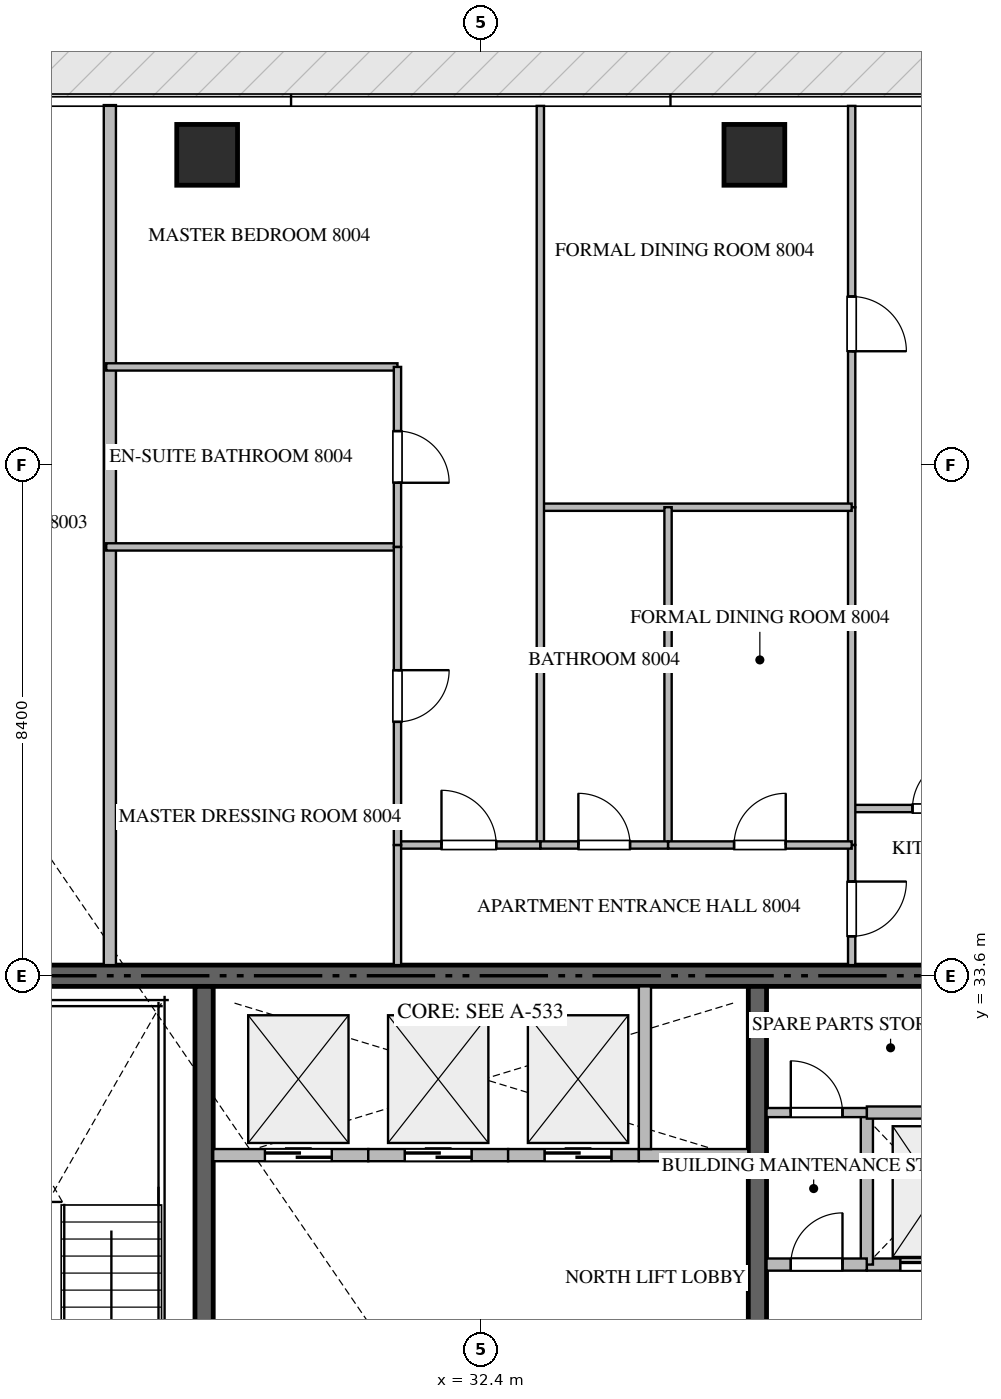
"""IFC4 building model, lengths in metres.
Left out: names, types, materials, properties, quantities, classifications, styles, units other than length and angle.
Written with IfcOpenShell. Run it as: python <this file> out.ifc"""

import sys

from ifc_helpers import new_model, si_unit, direction, frame, frame_2d, origin, origin_2d, place, context, subcontext, project, spatial, rectangle, extrude, source, transform, mapped, element, fill, save


model = new_model("IFC4")
c1 = context("Model", 3, precision=1e-05, world=origin(), true_north=direction((0.0, 1.0)))
c2 = subcontext(c1, "Body", "Model", "MODEL_VIEW")
j1 = project(units=[si_unit("LENGTHUNIT", "METRE"), si_unit("PLANEANGLEUNIT", "RADIAN")], contexts=[c1])
p1 = place(None, origin())
s1 = spatial("IfcSite", under=j1, at=p1, CompositionType="ELEMENT")
p2 = place(p1, origin())
s2 = spatial("IfcBuilding", under=s1, at=p2, CompositionType="ELEMENT")
p3 = place(p2, frame((0.0, 0.0, 321.8)))
s3 = spatial("IfcBuildingStorey", under=s2, at=p3, CompositionType="ELEMENT", Elevation=321.8)
p4 = place(p3, frame((41.4, 33.6, -0.26), z_axis=(0.0, 0.0, 1.0), x_axis=(-1.0, 0.0, 0.0)))
e1 = element("IfcWall", 1, at=p4, inside=s3, PredefinedType="SHEAR", context=c2, shape_type="SweptSolid", body=[
    extrude(rectangle(XDim=18.0, YDim=0.35, at=frame_2d((9.0, 0.0))), origin(), (0.0, 0.0, 1.0), 4.048),
])
p5 = place(p3, frame((27.85, 23.55, -0.26), z_axis=(0.0, 0.0, 1.0), x_axis=(0.0, 1.0, 0.0)))
e2 = element("IfcWall", 2, at=p5, inside=s3, PredefinedType="SHEAR", context=c2, shape_type="SweptSolid", body=[
    extrude(rectangle(XDim=9.875, YDim=0.3, at=frame_2d((4.938, 0.0))), origin(), (0.0, 0.0, 1.0), 4.048),
])
p6 = place(p3, frame((36.95, 27.05, -0.26), z_axis=(0.0, 0.0, 1.0), x_axis=(0.0, 1.0, 0.0)))
e3 = element("IfcWall", 3, at=p6, inside=s3, PredefinedType="SHEAR", context=c2, shape_type="SweptSolid", body=[
    extrude(rectangle(XDim=6.375, YDim=0.3, at=frame_2d((3.188, 0.0))), origin(), (0.0, 0.0, 1.0), 4.048),
])
m1 = source(origin(), c2, "Body", "SweptSolid", [
    extrude(rectangle(XDim=1.0, YDim=1.0, at=origin_2d()), origin(), (0.0, 0.0, 1.0), 4.05),
])
for number, where, z_axis, x_axis in (
    (4, (27.9, 47.1, -0.26), (0.0, 0.0, 1.0), (1.0, 0.0, 0.0)),
    (5, (36.9, 47.1, -0.26), (0.0, 0.0, 1.0), (1.0, 0.0, 0.0)),
):
    element("IfcColumn", number, at=place(p3, frame(where, z_axis=z_axis, x_axis=x_axis)), inside=s3, PredefinedType="COLUMN", context=c2, shape_type="MappedRepresentation", body=[
        mapped(m1, transform((0.0, 0.0, 0.0), scale=1.0)),
    ])
p7 = place(p3, frame((38.75, 28.85, 0.0), z_axis=(0.0, 0.0, 1.0), x_axis=(1.0, 0.0, 0.0)))
e6 = element("IfcWall", 6, at=p7, inside=s3, PredefinedType="STANDARD", context=c2, shape_type="SweptSolid", body=[
    extrude(rectangle(XDim=2.475, YDim=0.2, at=frame_2d((1.238, 0.0))), origin(), (0.0, 0.0, 1.0), 3.79),
])
p8 = place(p7, frame((0.55, 0.0, 0.0)))
e7 = element("IfcOpeningElement", 7, at=p8, cuts=e6, PredefinedType="OPENING", context=c2, shape_type="SweptSolid", body=[
    extrude(rectangle(XDim=1.2, YDim=2.2, at=frame_2d((0.6, 1.1))), frame((0.0, 0.11, 0.0), z_axis=(0.0, -1.0, 0.0), x_axis=(1.0, 0.0, 0.0)), (0.0, 0.0, 1.0), 0.22),
])
p9 = place(p3, frame((28.0, 30.65, 0.0), z_axis=(0.0, 0.0, 1.0), x_axis=(1.0, 0.0, 0.0)))
e8 = element("IfcWall", 8, at=p9, inside=s3, PredefinedType="STANDARD", context=c2, shape_type="SweptSolid", body=[
    extrude(rectangle(XDim=2.55, YDim=0.2, at=frame_2d((1.275, 0.0))), origin(), (0.0, 0.0, 1.0), 3.79),
])
p10 = place(p9, frame((0.85, 0.0, 0.0)))
e9 = element("IfcOpeningElement", 9, at=p10, cuts=e8, PredefinedType="OPENING", context=c2, shape_type="SweptSolid", body=[
    extrude(rectangle(XDim=1.1, YDim=2.2, at=frame_2d((0.55, 1.1))), frame((0.0, 0.11, 0.0), z_axis=(0.0, -1.0, 0.0), x_axis=(1.0, 0.0, 0.0)), (0.0, 0.0, 1.0), 0.22),
])
p11 = place(p3, frame((30.55, 30.65, 0.0), z_axis=(0.0, 0.0, 1.0), x_axis=(1.0, 0.0, 0.0)))
e10 = element("IfcWall", 10, at=p11, inside=s3, PredefinedType="STANDARD", context=c2, shape_type="SweptSolid", body=[
    extrude(rectangle(XDim=2.3, YDim=0.2, at=frame_2d((1.15, 0.0))), origin(), (0.0, 0.0, 1.0), 3.79),
])
p12 = place(p11, frame((0.6, 0.0, 0.0)))
e11 = element("IfcOpeningElement", 11, at=p12, cuts=e10, PredefinedType="OPENING", context=c2, shape_type="SweptSolid", body=[
    extrude(rectangle(XDim=1.1, YDim=2.2, at=frame_2d((0.55, 1.1))), frame((0.0, 0.11, 0.0), z_axis=(0.0, -1.0, 0.0), x_axis=(1.0, 0.0, 0.0)), (0.0, 0.0, 1.0), 0.22),
])
p13 = place(p3, frame((32.85, 30.65, 0.0), z_axis=(0.0, 0.0, 1.0), x_axis=(1.0, 0.0, 0.0)))
e12 = element("IfcWall", 12, at=p13, inside=s3, PredefinedType="STANDARD", context=c2, shape_type="SweptSolid", body=[
    extrude(rectangle(XDim=2.15, YDim=0.2, at=frame_2d((1.075, 0.0))), origin(), (0.0, 0.0, 1.0), 3.79),
])
p14 = place(p13, frame((0.6, 0.0, 0.0)))
e13 = element("IfcOpeningElement", 13, at=p14, cuts=e12, PredefinedType="OPENING", context=c2, shape_type="SweptSolid", body=[
    extrude(rectangle(XDim=1.1, YDim=2.2, at=frame_2d((0.55, 1.1))), frame((0.0, 0.11, 0.0), z_axis=(0.0, -1.0, 0.0), x_axis=(1.0, 0.0, 0.0)), (0.0, 0.0, 1.0), 0.22),
])
p15 = place(p3, frame((35.0, 30.65, 0.0), z_axis=(0.0, 0.0, 1.0), x_axis=(1.0, 0.0, 0.0)))
e14 = element("IfcWall", 14, at=p15, inside=s3, PredefinedType="STANDARD", context=c2, shape_type="SweptSolid", body=[
    extrude(rectangle(XDim=1.8, YDim=0.2, at=frame_2d((0.9, 0.0))), origin(), (0.0, 0.0, 1.0), 3.79),
])
p16 = place(p3, frame((35.1, 30.75, 0.0), z_axis=(0.0, 0.0, 1.0), x_axis=(0.0, 1.0, 0.0)))
e15 = element("IfcWall", 15, at=p16, inside=s3, PredefinedType="STANDARD", context=c2, shape_type="SweptSolid", body=[
    extrude(rectangle(XDim=2.675, YDim=0.2, at=frame_2d((1.337, 0.0))), origin(), (0.0, 0.0, 1.0), 3.79),
])
p17 = place(p3, frame((38.75, 28.85, 0.0), z_axis=(0.0, 0.0, 1.0), x_axis=(0.0, 1.0, 0.0)))
e16 = element("IfcWall", 16, at=p17, inside=s3, PredefinedType="STANDARD", context=c2, shape_type="SweptSolid", body=[
    extrude(rectangle(XDim=2.5, YDim=0.2, at=frame_2d((1.25, 0.0))), origin(), (0.0, 0.0, 1.0), 3.79),
])
p18 = place(p3, frame((38.75, 31.35, 0.0), z_axis=(0.0, 0.0, 1.0), x_axis=(1.0, 0.0, 0.0)))
e17 = element("IfcWall", 17, at=p18, inside=s3, PredefinedType="STANDARD", context=c2, shape_type="SweptSolid", body=[
    extrude(rectangle(XDim=2.475, YDim=0.2, at=frame_2d((1.238, 0.0))), origin(), (0.0, 0.0, 1.0), 3.79),
])
p19 = place(p3, frame((37.1, 28.85, 0.0), z_axis=(0.0, 0.0, 1.0), x_axis=(1.0, 0.0, 0.0)))
e18 = element("IfcWall", 18, at=p19, inside=s3, PredefinedType="STANDARD", context=c2, shape_type="SweptSolid", body=[
    extrude(rectangle(XDim=1.648, YDim=0.2, at=frame_2d((0.824, 0.0))), origin(), (0.0, 0.0, 1.0), 3.79),
])
p20 = place(p19, frame((0.399, 0.0, 0.0)))
e19 = element("IfcOpeningElement", 19, at=p20, cuts=e18, PredefinedType="OPENING", context=c2, shape_type="SweptSolid", body=[
    extrude(rectangle(XDim=0.85, YDim=2.1, at=frame_2d((0.425, 1.05))), frame((0.0, 0.11, 0.0), z_axis=(0.0, -1.0, 0.0), x_axis=(1.0, 0.0, 0.0)), (0.0, 0.0, 1.0), 0.22),
])
p21 = place(p3, frame((37.1, 31.35, 0.0), z_axis=(0.0, 0.0, 1.0), x_axis=(1.0, 0.0, 0.0)))
e20 = element("IfcWall", 20, at=p21, inside=s3, PredefinedType="PARTITIONING", context=c2, shape_type="SweptSolid", body=[
    extrude(rectangle(XDim=1.648, YDim=0.15, at=frame_2d((0.824, 0.0))), origin(), (0.0, 0.0, 1.0), 3.79),
])
p22 = place(p21, frame((0.399, 0.0, 0.0)))
e21 = element("IfcOpeningElement", 21, at=p22, cuts=e20, PredefinedType="OPENING", context=c2, shape_type="SweptSolid", body=[
    extrude(rectangle(XDim=0.85, YDim=2.1, at=frame_2d((0.425, 1.05))), frame((0.0, 0.085, 0.0), z_axis=(0.0, -1.0, 0.0), x_axis=(1.0, 0.0, 0.0)), (0.0, 0.0, 1.0), 0.17),
])
p23 = place(p3, frame((26.3, 33.775, 0.0), z_axis=(0.0, 0.0, 1.0), x_axis=(0.0, 1.0, 0.0)))
e22 = element("IfcWall", 22, at=p23, inside=s3, PredefinedType="PARTITIONING", context=c2, shape_type="SweptSolid", body=[
    extrude(rectangle(XDim=14.143, YDim=0.2, at=frame_2d((7.072, 0.0))), origin(), (0.0, 0.0, 1.0), 3.79),
])
p24 = place(p3, frame((38.5, 36.35, 0.0), z_axis=(0.0, 0.0, 1.0), x_axis=(1.0, 0.0, 0.0)))
e23 = element("IfcWall", 23, at=p24, inside=s3, PredefinedType="PARTITIONING", context=c2, shape_type="SweptSolid", body=[
    extrude(rectangle(XDim=2.85, YDim=0.12, at=frame_2d((1.425, 0.0))), origin(), (0.0, 0.0, 1.0), 3.492),
])
p25 = place(p24, frame((1.0, 0.0, 0.0)))
e24 = element("IfcOpeningElement", 24, at=p25, cuts=e23, PredefinedType="OPENING", context=c2, shape_type="SweptSolid", body=[
    extrude(rectangle(XDim=0.85, YDim=2.1, at=frame_2d((0.425, 1.05))), frame((0.0, 0.07, 0.0), z_axis=(0.0, -1.0, 0.0), x_axis=(1.0, 0.0, 0.0)), (0.0, 0.0, 1.0), 0.14),
])
p26 = place(p3, frame((38.5, 35.75, 0.0), z_axis=(0.0, 0.0, 1.0), x_axis=(0.0, -1.0, 0.0)))
e25 = element("IfcWall", 25, at=p26, inside=s3, PredefinedType="PARTITIONING", context=c2, shape_type="SweptSolid", body=[
    extrude(rectangle(XDim=1.975, YDim=0.12, at=frame_2d((0.988, 0.0))), origin(), (0.0, 0.0, 1.0), 3.79),
])
p27 = place(p26, frame((0.601, 0.0, 0.0)))
e26 = element("IfcOpeningElement", 26, at=p27, cuts=e25, PredefinedType="OPENING", context=c2, shape_type="SweptSolid", body=[
    extrude(rectangle(XDim=0.9, YDim=2.1, at=frame_2d((0.45, 1.05))), frame((0.0, 0.07, 0.0), z_axis=(0.0, -1.0, 0.0), x_axis=(1.0, 0.0, 0.0)), (0.0, 0.0, 1.0), 0.14),
])
p28 = place(p3, frame((38.5, 47.905, 0.0), z_axis=(0.0, 0.0, 1.0), x_axis=(0.0, -1.0, 0.0)))
e27 = element("IfcWall", 27, at=p28, inside=s3, PredefinedType="PARTITIONING", context=c2, shape_type="SweptSolid", body=[
    extrude(rectangle(XDim=6.6, YDim=0.12, at=frame_2d((3.3, 0.0))), origin(), (0.0, 0.0, 1.0), 3.79),
])
p29 = place(p28, frame((3.135, 0.0, 0.0)))
e28 = element("IfcOpeningElement", 28, at=p29, cuts=e27, PredefinedType="OPENING", context=c2, shape_type="SweptSolid", body=[
    extrude(rectangle(XDim=0.9, YDim=2.1, at=frame_2d((0.45, 1.05))), frame((0.0, 0.07, 0.0), z_axis=(0.0, -1.0, 0.0), x_axis=(1.0, 0.0, 0.0)), (0.0, 0.0, 1.0), 0.14),
])
p30 = place(p3, frame((38.5, 41.303, 0.0), z_axis=(0.0, 0.0, 1.0), x_axis=(0.0, -1.0, 0.0)))
e29 = element("IfcWall", 29, at=p30, inside=s3, PredefinedType="PARTITIONING", context=c2, shape_type="SweptSolid", body=[
    extrude(rectangle(XDim=5.551, YDim=0.12, at=frame_2d((2.775, 0.0))), origin(), (0.0, 0.0, 1.0), 3.79),
])
p31 = place(p3, frame((33.38, 41.305, 0.0), z_axis=(0.0, 0.0, 1.0), x_axis=(1.0, 0.0, 0.0)))
e30 = element("IfcWall", 30, at=p31, inside=s3, PredefinedType="PARTITIONING", context=c2, shape_type="SweptSolid", body=[
    extrude(rectangle(XDim=5.12, YDim=0.12, at=frame_2d((2.56, 0.0))), origin(), (0.0, 0.0, 1.0), 3.79),
])
p32 = place(p3, frame((33.38, 47.905, 0.0), z_axis=(0.0, 0.0, 1.0), x_axis=(0.0, -1.0, 0.0)))
e31 = element("IfcWall", 31, at=p32, inside=s3, PredefinedType="PARTITIONING", context=c2, shape_type="SweptSolid", body=[
    extrude(rectangle(XDim=12.155, YDim=0.12, at=frame_2d((6.078, 0.0))), origin(), (0.0, 0.0, 1.0), 3.79),
])
p33 = place(p3, frame((35.48, 41.305, 0.0), z_axis=(0.0, 0.0, 1.0), x_axis=(0.0, -1.0, 0.0)))
e32 = element("IfcWall", 32, at=p33, inside=s3, PredefinedType="PARTITIONING", context=c2, shape_type="SweptSolid", body=[
    extrude(rectangle(XDim=5.555, YDim=0.12, at=frame_2d((2.777, 0.0))), origin(), (0.0, 0.0, 1.0), 3.79),
])
p34 = place(p3, frame((33.38, 35.75, 0.0), z_axis=(0.0, 0.0, 1.0), x_axis=(1.0, 0.0, 0.0)))
e33 = element("IfcWall", 33, at=p34, inside=s3, PredefinedType="PARTITIONING", context=c2, shape_type="SweptSolid", body=[
    extrude(rectangle(XDim=2.1, YDim=0.12, at=frame_2d((1.05, 0.0))), origin(), (0.0, 0.0, 1.0), 3.79),
])
p35 = place(p34, frame((0.625, 0.0, 0.0)))
e34 = element("IfcOpeningElement", 34, at=p35, cuts=e33, PredefinedType="OPENING", context=c2, shape_type="SweptSolid", body=[
    extrude(rectangle(XDim=0.85, YDim=2.1, at=frame_2d((0.425, 1.05))), frame((0.0, 0.07, 0.0), z_axis=(0.0, -1.0, 0.0), x_axis=(1.0, 0.0, 0.0)), (0.0, 0.0, 1.0), 0.14),
])
p36 = place(p3, frame((35.482, 35.75, 0.0), z_axis=(0.0, 0.0, 1.0), x_axis=(1.0, 0.0, 0.0)))
e35 = element("IfcWall", 35, at=p36, inside=s3, PredefinedType="PARTITIONING", context=c2, shape_type="SweptSolid", body=[
    extrude(rectangle(XDim=3.018, YDim=0.12, at=frame_2d((1.509, 0.0))), origin(), (0.0, 0.0, 1.0), 3.79),
])
p37 = place(p36, frame((1.084, 0.0, 0.0)))
e36 = element("IfcOpeningElement", 36, at=p37, cuts=e35, PredefinedType="OPENING", context=c2, shape_type="SweptSolid", body=[
    extrude(rectangle(XDim=0.85, YDim=2.1, at=frame_2d((0.425, 1.05))), frame((0.0, 0.07, 0.0), z_axis=(0.0, -1.0, 0.0), x_axis=(1.0, 0.0, 0.0)), (0.0, 0.0, 1.0), 0.14),
])
p38 = place(p3, frame((31.03, 35.75, 0.0), z_axis=(0.0, 0.0, 1.0), x_axis=(1.0, 0.0, 0.0)))
e37 = element("IfcWall", 37, at=p38, inside=s3, PredefinedType="PARTITIONING", context=c2, shape_type="SweptSolid", body=[
    extrude(rectangle(XDim=2.348, YDim=0.12, at=frame_2d((1.174, 0.0))), origin(), (0.0, 0.0, 1.0), 3.79),
])
p39 = place(p38, frame((0.724, 0.0, 0.0)))
e38 = element("IfcOpeningElement", 38, at=p39, cuts=e37, PredefinedType="OPENING", context=c2, shape_type="SweptSolid", body=[
    extrude(rectangle(XDim=0.9, YDim=2.1, at=frame_2d((0.45, 1.05))), frame((0.0, 0.07, 0.0), z_axis=(0.0, -1.0, 0.0), x_axis=(1.0, 0.0, 0.0)), (0.0, 0.0, 1.0), 0.14),
])
for number, where, z_axis, x_axis in (
    (39, (26.24, 43.612, 0.0), (0.0, 0.0, 1.0), (1.0, 0.0, 0.0)),
    (40, (26.24, 40.652, 0.0), (0.0, 0.0, 1.0), (1.0, 0.0, 0.0)),
):
    element("IfcWall", number, at=place(p3, frame(where, z_axis=z_axis, x_axis=x_axis)), inside=s3, PredefinedType="PARTITIONING", context=c2, shape_type="SweptSolid", body=[
        extrude(rectangle(XDim=4.79, YDim=0.12, at=frame_2d((2.395, 0.0))), origin(), (0.0, 0.0, 1.0), 3.79),
    ])
p40 = place(p3, frame((31.03, 43.612, 0.0), z_axis=(0.0, 0.0, 1.0), x_axis=(0.0, -1.0, 0.0)))
e41 = element("IfcWall", 41, at=p40, inside=s3, PredefinedType="PARTITIONING", context=c2, shape_type="SweptSolid", body=[
    extrude(rectangle(XDim=2.96, YDim=0.12, at=frame_2d((1.48, 0.0))), origin(), (0.0, 0.0, 1.0), 3.79),
])
p41 = place(p40, frame((1.055, 0.0, 0.0)))
e42 = element("IfcOpeningElement", 42, at=p41, cuts=e41, PredefinedType="OPENING", context=c2, shape_type="SweptSolid", body=[
    extrude(rectangle(XDim=0.85, YDim=2.1, at=frame_2d((0.425, 1.05))), frame((0.0, 0.07, 0.0), z_axis=(0.0, -1.0, 0.0), x_axis=(1.0, 0.0, 0.0)), (0.0, 0.0, 1.0), 0.14),
])
p42 = place(p3, frame((31.03, 40.65, 0.0), z_axis=(0.0, 0.0, 1.0), x_axis=(0.0, -1.0, 0.0)))
e43 = element("IfcWall", 43, at=p42, inside=s3, PredefinedType="PARTITIONING", context=c2, shape_type="SweptSolid", body=[
    extrude(rectangle(XDim=4.9, YDim=0.12, at=frame_2d((2.45, 0.0))), origin(), (0.0, 0.0, 1.0), 3.79),
])
p43 = place(p42, frame((2.025, 0.0, 0.0)))
e44 = element("IfcOpeningElement", 44, at=p43, cuts=e43, PredefinedType="OPENING", context=c2, shape_type="SweptSolid", body=[
    extrude(rectangle(XDim=0.85, YDim=2.1, at=frame_2d((0.425, 1.05))), frame((0.0, 0.07, 0.0), z_axis=(0.0, -1.0, 0.0), x_axis=(1.0, 0.0, 0.0)), (0.0, 0.0, 1.0), 0.14),
])
p44 = place(p3, frame((31.03, 35.748, 0.0), z_axis=(0.0, 0.0, 1.0), x_axis=(0.0, -1.0, 0.0)))
e45 = element("IfcWall", 45, at=p44, inside=s3, PredefinedType="PARTITIONING", context=c2, shape_type="SweptSolid", body=[
    extrude(rectangle(XDim=1.973, YDim=0.12, at=frame_2d((0.987, 0.0))), origin(), (0.0, 0.0, 1.0), 3.79),
])
m2 = source(origin(), c2, "Body", "SweptSolid", [
    extrude(rectangle(XDim=1.2, YDim=2.2, at=frame_2d((0.6, 1.1))), frame((0.0, 0.025, 0.0), z_axis=(0.0, -1.0, 0.0), x_axis=(1.0, 0.0, 0.0)), (0.0, 0.0, 1.0), 0.05),
])
p45 = place(p8, origin())
e46 = element("IfcDoor", 46, at=p45, inside=s3, OperationType="DOUBLE_DOOR_SLIDING", PredefinedType="DOOR", context=c2, shape_type="MappedRepresentation", body=[
    mapped(m2, transform((0.0, 0.0, 0.0), scale=1.0)),
])
fill(e7, e46)
m3 = source(origin(), c2, "Body", "SweptSolid", [
    extrude(rectangle(XDim=1.1, YDim=2.2, at=frame_2d((0.55, 1.1))), frame((0.0, 0.025, 0.0), z_axis=(0.0, -1.0, 0.0), x_axis=(1.0, 0.0, 0.0)), (0.0, 0.0, 1.0), 0.05),
])
p46 = place(p10, origin())
e47 = element("IfcDoor", 47, at=p46, inside=s3, OperationType="DOUBLE_DOOR_SLIDING", PredefinedType="DOOR", context=c2, shape_type="MappedRepresentation", body=[
    mapped(m3, transform((0.0, 0.0, 0.0), scale=1.0)),
])
fill(e9, e47)
p47 = place(p12, origin())
e48 = element("IfcDoor", 48, at=p47, inside=s3, OperationType="DOUBLE_DOOR_SLIDING", PredefinedType="DOOR", context=c2, shape_type="MappedRepresentation", body=[
    mapped(m3, transform((0.0, 0.0, 0.0), scale=1.0)),
])
fill(e11, e48)
p48 = place(p14, origin())
e49 = element("IfcDoor", 49, at=p48, inside=s3, OperationType="DOUBLE_DOOR_SLIDING", PredefinedType="DOOR", context=c2, shape_type="MappedRepresentation", body=[
    mapped(m3, transform((0.0, 0.0, 0.0), scale=1.0)),
])
fill(e13, e49)
m4 = source(origin(), c2, "Body", "SweptSolid", [
    extrude(rectangle(XDim=0.85, YDim=2.1, at=frame_2d((0.425, 1.05))), frame((0.0, 0.025, 0.0), z_axis=(0.0, -1.0, 0.0), x_axis=(1.0, 0.0, 0.0)), (0.0, 0.0, 1.0), 0.05),
])
p49 = place(p20, origin())
e50 = element("IfcDoor", 50, at=p49, inside=s3, OperationType="SINGLE_SWING_RIGHT", PredefinedType="DOOR", context=c2, shape_type="MappedRepresentation", body=[
    mapped(m4, transform((0.0, 0.0, 0.0), scale=1.0)),
])
fill(e19, e50)
p50 = place(p22, origin())
e51 = element("IfcDoor", 51, at=p50, inside=s3, OperationType="SINGLE_SWING_LEFT", PredefinedType="DOOR", context=c2, shape_type="MappedRepresentation", body=[
    mapped(m4, transform((0.0, 0.0, 0.0), scale=1.0)),
])
fill(e21, e51)
p51 = place(p25, origin())
e52 = element("IfcDoor", 52, at=p51, inside=s3, OperationType="SINGLE_SWING_RIGHT", PredefinedType="DOOR", context=c2, shape_type="MappedRepresentation", body=[
    mapped(m4, transform((0.0, 0.0, 0.0), scale=1.0)),
])
fill(e24, e52)
m5 = source(origin(), c2, "Body", "SweptSolid", [
    extrude(rectangle(XDim=0.9, YDim=2.1, at=frame_2d((0.45, 1.05))), frame((0.0, 0.025, 0.0), z_axis=(0.0, -1.0, 0.0), x_axis=(1.0, 0.0, 0.0)), (0.0, 0.0, 1.0), 0.05),
])
p52 = place(p27, origin())
e53 = element("IfcDoor", 53, at=p52, inside=s3, OperationType="SINGLE_SWING_LEFT", PredefinedType="DOOR", context=c2, shape_type="MappedRepresentation", body=[
    mapped(m5, transform((0.0, 0.0, 0.0), scale=1.0)),
])
fill(e26, e53)
p53 = place(p29, origin())
e54 = element("IfcDoor", 54, at=p53, inside=s3, OperationType="SINGLE_SWING_RIGHT", PredefinedType="DOOR", context=c2, shape_type="MappedRepresentation", body=[
    mapped(m5, transform((0.0, 0.0, 0.0), scale=1.0)),
])
fill(e28, e54)
p54 = place(p35, origin())
e55 = element("IfcDoor", 55, at=p54, inside=s3, OperationType="SINGLE_SWING_LEFT", PredefinedType="DOOR", context=c2, shape_type="MappedRepresentation", body=[
    mapped(m4, transform((0.0, 0.0, 0.0), scale=1.0)),
])
fill(e34, e55)
p55 = place(p37, origin())
e56 = element("IfcDoor", 56, at=p55, inside=s3, OperationType="SINGLE_SWING_RIGHT", PredefinedType="DOOR", context=c2, shape_type="MappedRepresentation", body=[
    mapped(m4, transform((0.0, 0.0, 0.0), scale=1.0)),
])
fill(e36, e56)
p56 = place(p39, origin())
e57 = element("IfcDoor", 57, at=p56, inside=s3, OperationType="SINGLE_SWING_LEFT", PredefinedType="DOOR", context=c2, shape_type="MappedRepresentation", body=[
    mapped(m5, transform((0.0, 0.0, 0.0), scale=1.0)),
])
fill(e38, e57)
p57 = place(p41, origin())
e58 = element("IfcDoor", 58, at=p57, inside=s3, OperationType="SINGLE_SWING_RIGHT", PredefinedType="DOOR", context=c2, shape_type="MappedRepresentation", body=[
    mapped(m4, transform((0.0, 0.0, 0.0), scale=1.0)),
])
fill(e42, e58)
p58 = place(p43, origin())
e59 = element("IfcDoor", 59, at=p58, inside=s3, OperationType="SINGLE_SWING_LEFT", PredefinedType="DOOR", context=c2, shape_type="MappedRepresentation", body=[
    mapped(m4, transform((0.0, 0.0, 0.0), scale=1.0)),
])
fill(e44, e59)
save(model, sys.argv[1])
